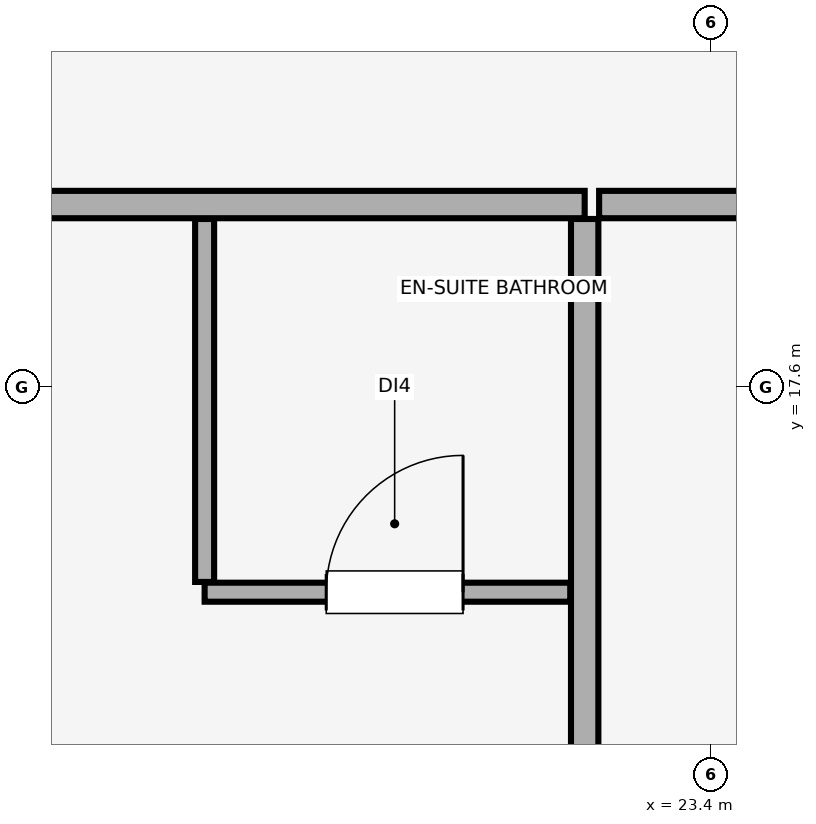
"""IFC4 building model, lengths in metres.
Left out: names, types, materials, properties, quantities, classifications, styles, units other than length and angle.
Written with IfcOpenShell. Run it as: python <this file> out.ifc"""

import sys

from ifc_helpers import new_model, si_unit, direction, frame, frame_2d, origin, place, context, subcontext, project, spatial, rectangle, extrude, element, fill, save


model = new_model("IFC4")
c1 = context("Model", 3, precision=1e-05, world=origin(), true_north=direction((0.0, 1.0)))
c2 = subcontext(c1, "Body", "Model", "MODEL_VIEW")
j1 = project(units=[si_unit("LENGTHUNIT", "METRE"), si_unit("PLANEANGLEUNIT", "RADIAN")], contexts=[c1])
p1 = place(None, origin())
s1 = spatial("IfcSite", under=j1, at=p1, CompositionType="ELEMENT")
p2 = place(p1, origin())
s2 = spatial("IfcBuilding", under=s1, at=p2, CompositionType="ELEMENT")
p3 = place(p2, frame((0.0, 0.0, 285.9)))
s3 = spatial("IfcBuildingStorey", under=s2, at=p3, CompositionType="ELEMENT", Elevation=285.9)
p4 = place(p3, frame((9.15, 18.8, 0.0), z_axis=(0.0, 0.0, 1.0), x_axis=(1.0, 0.0, 0.0)))
e1 = element("IfcWall", 1, at=p4, inside=s3, PredefinedType="PARTITIONING", context=c2, shape_type="SweptSolid", body=[
    extrude(rectangle(XDim=13.417, YDim=0.18, at=frame_2d((6.708, 0.0))), origin(), (0.0, 0.0, 1.0), 4.1),
])
p5 = place(p4, frame((8.423, 0.0, 0.0)))
e2 = element("IfcOpeningElement", 2, at=p5, cuts=e1, PredefinedType="OPENING", context=c2, shape_type="SweptSolid", body=[
    extrude(rectangle(XDim=1.0, YDim=2.15, at=frame_2d((0.5, 1.075))), frame((0.0, 0.1, 0.0), z_axis=(0.0, -1.0, 0.0), x_axis=(1.0, 0.0, 0.0)), (0.0, 0.0, 1.0), 0.2),
])
p6 = place(p3, frame((22.567, 7.15, 0.0), z_axis=(0.0, 0.0, 1.0), x_axis=(0.0, 1.0, 0.0)))
e3 = element("IfcWall", 3, at=p6, inside=s3, PredefinedType="PARTITIONING", context=c2, shape_type="SweptSolid", body=[
    extrude(rectangle(XDim=11.555, YDim=0.18, at=frame_2d((5.778, 0.0))), origin(), (0.0, 0.0, 1.0), 4.1),
])
p7 = place(p3, frame((20.067, 16.25, 0.0), z_axis=(0.0, 0.0, 1.0), x_axis=(1.0, 0.0, 0.0)))
e4 = element("IfcWall", 4, at=p7, inside=s3, PredefinedType="PARTITIONING", context=c2, shape_type="SweptSolid", body=[
    extrude(rectangle(XDim=2.405, YDim=0.125, at=frame_2d((1.203, 0.0))), origin(), (0.0, 0.0, 1.0), 4.1),
])
p8 = place(p7, frame((0.8, 0.0, 0.0)))
e5 = element("IfcOpeningElement", 5, at=p8, cuts=e4, PredefinedType="OPENING", context=c2, shape_type="SweptSolid", body=[
    extrude(rectangle(XDim=0.9, YDim=2.1, at=frame_2d((0.45, 1.05))), frame((0.0, 0.073, 0.0), z_axis=(0.0, -1.0, 0.0), x_axis=(1.0, 0.0, 0.0)), (0.0, 0.0, 1.0), 0.145),
])
p9 = place(p3, frame((20.067, 16.317, 0.0), z_axis=(0.0, 0.0, 1.0), x_axis=(0.0, 1.0, 0.0)))
e6 = element("IfcWall", 6, at=p9, inside=s3, PredefinedType="PARTITIONING", context=c2, shape_type="SweptSolid", body=[
    extrude(rectangle(XDim=2.388, YDim=0.125, at=frame_2d((1.194, 0.0))), origin(), (0.0, 0.0, 1.0), 4.1),
])
p10 = place(p3, frame((22.662, 18.8, 0.0), z_axis=(0.0, 0.0, 1.0), x_axis=(1.0, 0.0, 0.0)))
e7 = element("IfcWall", 7, at=p10, inside=s3, PredefinedType="PARTITIONING", context=c2, shape_type="SweptSolid", body=[
    extrude(rectangle(XDim=9.622, YDim=0.18, at=frame_2d((4.811, 0.0))), origin(), (0.0, 0.0, 1.0), 4.1),
])
p11 = place(p10, frame((3.37, 0.0, 0.0)))
e8 = element("IfcOpeningElement", 8, at=p11, cuts=e7, PredefinedType="OPENING", context=c2, shape_type="SweptSolid", body=[
    extrude(rectangle(XDim=1.0, YDim=2.15, at=frame_2d((0.5, 1.075))), frame((0.0, 0.1, 0.0), z_axis=(0.0, -1.0, 0.0), x_axis=(1.0, 0.0, 0.0)), (0.0, 0.0, 1.0), 0.2),
])
p12 = place(p8, origin())
e9 = element("IfcDoor", 9, at=p12, inside=s3, OperationType="SINGLE_SWING_RIGHT", PredefinedType="DOOR", context=c2, shape_type="SweptSolid", body=[
    extrude(rectangle(XDim=0.9, YDim=2.1, at=frame_2d((0.45, 1.05))), frame((0.0, 0.025, 0.0), z_axis=(0.0, -1.0, 0.0), x_axis=(1.0, 0.0, 0.0)), (0.0, 0.0, 1.0), 0.05),
])
fill(e5, e9)
save(model, sys.argv[1])
